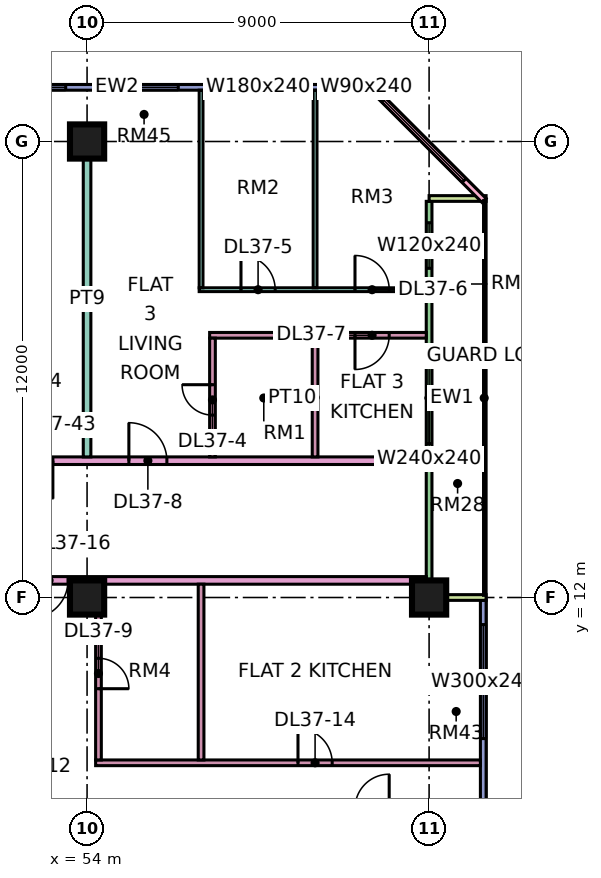
"""IFC4 building model, lengths in metres.
Left out: names, types, materials, properties, quantities, classifications, styles, units other than length and angle.
Written with IfcOpenShell. Run it as: python <this file> out.ifc"""

import sys

from ifc_helpers import new_model, si_unit, direction, frame, frame_2d, origin, origin_2d, place, context, subcontext, project, spatial, rectangle, extrude, element, fill, save


model = new_model("IFC4")
c1 = context("Model", 3, precision=1e-05, world=origin(), true_north=direction((0.0, 1.0)))
c2 = subcontext(c1, "Body", "Model", "MODEL_VIEW")
j1 = project(units=[si_unit("LENGTHUNIT", "METRE"), si_unit("PLANEANGLEUNIT", "RADIAN")], contexts=[c1])
p1 = place(None, origin())
s1 = spatial("IfcSite", under=j1, at=p1, CompositionType="ELEMENT")
p2 = place(p1, origin())
s2 = spatial("IfcBuilding", under=s1, at=p2, CompositionType="ELEMENT")
p3 = place(p2, frame((0.0, 0.0, 164.9)))
s3 = spatial("IfcBuildingStorey", under=s2, at=p3, CompositionType="ELEMENT", Elevation=164.9)
for number, where, z_axis, x_axis in (
    (1, (54.0, 12.0, 0.0), (0.0, 0.0, 1.0), (1.0, 0.0, 0.0)),
    (2, (54.0, 24.0, 0.0), (0.0, 0.0, 1.0), (1.0, 0.0, 0.0)),
    (3, (63.0, 12.0, 0.0), (0.0, 0.0, 1.0), (1.0, 0.0, 0.0)),
):
    element("IfcColumn", number, at=place(p3, frame(where, z_axis=z_axis, x_axis=x_axis)), inside=s3, PredefinedType="COLUMN", context=c2, shape_type="SweptSolid", body=[
        extrude(rectangle(XDim=0.9, YDim=0.9, at=origin_2d()), origin(), (0.0, 0.0, 1.0), 3.75),
    ])
p4 = place(p3, frame((61.5, 25.425, 0.0), z_axis=(0.0, 0.0, 1.0), x_axis=(-1.0, 0.0, 0.0)))
e4 = element("IfcWall", 4, at=p4, inside=s3, PredefinedType="SOLIDWALL", context=c2, shape_type="SweptSolid", body=[
    extrude(rectangle(XDim=13.425, YDim=0.15, at=frame_2d((6.712, 0.0))), origin(), (0.0, 0.0, 1.0), 3.35),
])
p5 = place(p4, frame((0.3, 0.0, 0.45)))
e5 = element("IfcOpeningElement", 5, at=p5, cuts=e4, PredefinedType="OPENING", context=c2, shape_type="SweptSolid", body=[
    extrude(rectangle(XDim=0.9, YDim=2.4, at=frame_2d((0.45, 1.2))), frame((0.0, 0.085, 0.0), z_axis=(0.0, -1.0, 0.0), x_axis=(1.0, 0.0, 0.0)), (0.0, 0.0, 1.0), 0.17),
])
p6 = place(p4, frame((2.1, 0.0, 0.45)))
e6 = element("IfcOpeningElement", 6, at=p6, cuts=e4, PredefinedType="OPENING", context=c2, shape_type="SweptSolid", body=[
    extrude(rectangle(XDim=1.8, YDim=2.4, at=frame_2d((0.9, 1.2))), frame((0.0, 0.085, 0.0), z_axis=(0.0, -1.0, 0.0), x_axis=(1.0, 0.0, 0.0)), (0.0, 0.0, 1.0), 0.17),
])
p7 = place(p4, frame((5.1, 0.0, 0.45)))
e7 = element("IfcOpeningElement", 7, at=p7, cuts=e4, PredefinedType="OPENING", context=c2, shape_type="SweptSolid", body=[
    extrude(rectangle(XDim=1.8, YDim=2.4, at=frame_2d((0.9, 1.2))), frame((0.0, 0.085, 0.0), z_axis=(0.0, -1.0, 0.0), x_axis=(1.0, 0.0, 0.0)), (0.0, 0.0, 1.0), 0.17),
])
p8 = place(p4, frame((8.062, 0.0, 0.45)))
e8 = element("IfcOpeningElement", 8, at=p8, cuts=e4, PredefinedType="OPENING", context=c2, shape_type="SweptSolid", body=[
    extrude(rectangle(XDim=4.8, YDim=2.4, at=frame_2d((2.4, 1.2))), frame((0.0, 0.085, 0.0), z_axis=(0.0, -1.0, 0.0), x_axis=(1.0, 0.0, 0.0)), (0.0, 0.0, 1.0), 0.17),
])
p9 = place(p3, frame((64.425, 1.5, 0.0), z_axis=(0.0, 0.0, 1.0), x_axis=(0.0, 1.0, 0.0)))
e9 = element("IfcWall", 9, at=p9, inside=s3, PredefinedType="SOLIDWALL", context=c2, shape_type="SweptSolid", body=[
    extrude(rectangle(XDim=10.425, YDim=0.15, at=frame_2d((5.212, 0.0))), origin(), (0.0, 0.0, 1.0), 3.35),
])
p10 = place(p9, frame((0.975, 0.0, 0.45)))
e10 = element("IfcOpeningElement", 10, at=p10, cuts=e9, PredefinedType="OPENING", context=c2, shape_type="SweptSolid", body=[
    extrude(rectangle(XDim=3.0, YDim=2.4, at=frame_2d((1.5, 1.2))), frame((0.0, 0.085, 0.0), z_axis=(0.0, -1.0, 0.0), x_axis=(1.0, 0.0, 0.0)), (0.0, 0.0, 1.0), 0.17),
])
p11 = place(p9, frame((6.788, 0.0, 0.45)))
e11 = element("IfcOpeningElement", 11, at=p11, cuts=e9, PredefinedType="OPENING", context=c2, shape_type="SweptSolid", body=[
    extrude(rectangle(XDim=3.0, YDim=2.4, at=frame_2d((1.5, 1.2))), frame((0.0, 0.085, 0.0), z_axis=(0.0, -1.0, 0.0), x_axis=(1.0, 0.0, 0.0)), (0.0, 0.0, 1.0), 0.17),
])
p12 = place(p3, frame((63.0, 12.075, 0.0), z_axis=(0.0, 0.0, 1.0), x_axis=(0.0, 1.0, 0.0)))
e12 = element("IfcWall", 12, at=p12, inside=s3, PredefinedType="SOLIDWALL", context=c2, shape_type="SweptSolid", body=[
    extrude(rectangle(XDim=10.35, YDim=0.15, at=frame_2d((5.175, 0.0))), origin(), (0.0, 0.0, 1.0), 3.35),
])
p13 = place(p12, frame((3.975, 0.0, 0.45)))
e13 = element("IfcOpeningElement", 13, at=p13, cuts=e12, PredefinedType="OPENING", context=c2, shape_type="SweptSolid", body=[
    extrude(rectangle(XDim=2.4, YDim=2.4, at=frame_2d((1.2, 1.2))), frame((0.0, 0.085, 0.0), z_axis=(0.0, -1.0, 0.0), x_axis=(1.0, 0.0, 0.0)), (0.0, 0.0, 1.0), 0.17),
])
p14 = place(p12, frame((8.587, 0.0, 0.45)))
e14 = element("IfcOpeningElement", 14, at=p14, cuts=e12, PredefinedType="OPENING", context=c2, shape_type="SweptSolid", body=[
    extrude(rectangle(XDim=1.2, YDim=2.4, at=frame_2d((0.6, 1.2))), frame((0.0, 0.085, 0.0), z_axis=(0.0, -1.0, 0.0), x_axis=(1.0, 0.0, 0.0)), (0.0, 0.0, 1.0), 0.17),
])
for number, where, z_axis, x_axis in (
    (15, (64.5, 12.0, 0.0), (0.0, 0.0, 1.0), (-1.0, 0.0, 0.0)),
    (16, (64.5, 22.5, 0.0), (0.0, 0.0, 1.0), (-1.0, 0.0, 0.0)),
):
    element("IfcWall", number, at=place(p3, frame(where, z_axis=z_axis, x_axis=x_axis)), inside=s3, PredefinedType="SOLIDWALL", context=c2, shape_type="SweptSolid", body=[
        extrude(rectangle(XDim=1.5, YDim=0.15, at=frame_2d((0.75, 0.0))), origin(), (0.0, 0.0, 1.0), 3.35),
    ])
p15 = place(p3, frame((64.447, 22.447, 0.0), z_axis=(0.0, 0.0, 1.0), x_axis=(-0.707106781187, 0.707106781187, 0.0)))
e17 = element("IfcWall", 17, at=p15, inside=s3, PredefinedType="SOLIDWALL", context=c2, shape_type="SweptSolid", body=[
    extrude(rectangle(XDim=4.243, YDim=0.15, at=frame_2d((2.121, 0.0))), origin(), (0.0, 0.0, 1.0), 3.35),
])
p16 = place(p15, frame((0.744, 0.0, 0.45)))
e18 = element("IfcOpeningElement", 18, at=p16, cuts=e17, PredefinedType="OPENING", context=c2, shape_type="SweptSolid", body=[
    extrude(rectangle(XDim=3.0, YDim=2.4, at=frame_2d((1.5, 1.2))), frame((0.0, 0.085, 0.0), z_axis=(0.0, -1.0, 0.0), x_axis=(1.0, 0.0, 0.0)), (0.0, 0.0, 1.0), 0.17),
])
p17 = place(p3, frame((40.65, 12.45, 0.0), z_axis=(0.0, 0.0, 1.0), x_axis=(1.0, 0.0, 0.0)))
e19 = element("IfcWall", 19, at=p17, inside=s3, PredefinedType="PARTITIONING", context=c2, shape_type="SweptSolid", body=[
    extrude(rectangle(XDim=22.276, YDim=0.2, at=frame_2d((11.138, 0.0))), origin(), (0.0, 0.0, 1.0), 3.35),
])
p18 = place(p17, frame((11.85, 0.0, 0.0)))
e20 = element("IfcOpeningElement", 20, at=p18, cuts=e19, PredefinedType="OPENING", context=c2, shape_type="SweptSolid", body=[
    extrude(rectangle(XDim=1.0, YDim=2.1, at=frame_2d((0.5, 1.05))), frame((0.0, 0.11, 0.0), z_axis=(0.0, -1.0, 0.0), x_axis=(1.0, 0.0, 0.0)), (0.0, 0.0, 1.0), 0.22),
])
p19 = place(p17, frame((1.05, 0.0, 0.0)))
e21 = element("IfcOpeningElement", 21, at=p19, cuts=e19, PredefinedType="OPENING", context=c2, shape_type="SweptSolid", body=[
    extrude(rectangle(XDim=1.0, YDim=2.1, at=frame_2d((0.5, 1.05))), frame((0.0, 0.11, 0.0), z_axis=(0.0, -1.0, 0.0), x_axis=(1.0, 0.0, 0.0)), (0.0, 0.0, 1.0), 0.22),
])
p20 = place(p3, frame((51.225, 15.6, 0.0), z_axis=(0.0, 0.0, 1.0), x_axis=(1.0, 0.0, 0.0)))
e22 = element("IfcWall", 22, at=p20, inside=s3, PredefinedType="PARTITIONING", context=c2, shape_type="SweptSolid", body=[
    extrude(rectangle(XDim=11.701, YDim=0.2, at=frame_2d((5.851, 0.0))), origin(), (0.0, 0.0, 1.0), 3.35),
])
p21 = place(p20, frame((3.875, 0.0, 0.0)))
e23 = element("IfcOpeningElement", 23, at=p21, cuts=e22, PredefinedType="OPENING", context=c2, shape_type="SweptSolid", body=[
    extrude(rectangle(XDim=1.0, YDim=2.1, at=frame_2d((0.5, 1.05))), frame((0.0, 0.11, 0.0), z_axis=(0.0, -1.0, 0.0), x_axis=(1.0, 0.0, 0.0)), (0.0, 0.0, 1.0), 0.22),
])
p22 = place(p20, frame((0.875, 0.0, 0.0)))
e24 = element("IfcOpeningElement", 24, at=p22, cuts=e22, PredefinedType="OPENING", context=c2, shape_type="SweptSolid", body=[
    extrude(rectangle(XDim=1.0, YDim=2.1, at=frame_2d((0.5, 1.05))), frame((0.0, 0.11, 0.0), z_axis=(0.0, -1.0, 0.0), x_axis=(1.0, 0.0, 0.0)), (0.0, 0.0, 1.0), 0.22),
])
p23 = place(p3, frame((54.0, 15.7, 0.0), z_axis=(0.0, 0.0, 1.0), x_axis=(0.0, 1.0, 0.0)))
e25 = element("IfcWall", 25, at=p23, inside=s3, PredefinedType="PARTITIONING", context=c2, shape_type="SweptSolid", body=[
    extrude(rectangle(XDim=8.3, YDim=0.2, at=frame_2d((4.15, 0.0))), origin(), (0.0, 0.0, 1.0), 3.35),
])
p24 = place(p3, frame((54.225, 7.65, 0.0), z_axis=(0.0, 0.0, 1.0), x_axis=(1.0, 0.0, 0.0)))
e26 = element("IfcWall", 26, at=p24, inside=s3, PredefinedType="PARTITIONING", context=c2, shape_type="SweptSolid", body=[
    extrude(rectangle(XDim=10.125, YDim=0.15, at=frame_2d((5.062, 0.0))), origin(), (0.0, 0.0, 1.0), 3.35),
])
p25 = place(p24, frame((5.325, 0.0, 0.0)))
e27 = element("IfcOpeningElement", 27, at=p25, cuts=e26, PredefinedType="OPENING", context=c2, shape_type="SweptSolid", body=[
    extrude(rectangle(XDim=0.9, YDim=2.1, at=frame_2d((0.45, 1.05))), frame((0.0, 0.085, 0.0), z_axis=(0.0, -1.0, 0.0), x_axis=(1.0, 0.0, 0.0)), (0.0, 0.0, 1.0), 0.17),
])
p26 = place(p3, frame((54.3, 7.725, 0.0), z_axis=(0.0, 0.0, 1.0), x_axis=(0.0, 1.0, 0.0)))
e28 = element("IfcWall", 28, at=p26, inside=s3, PredefinedType="PARTITIONING", context=c2, shape_type="SweptSolid", body=[
    extrude(rectangle(XDim=4.625, YDim=0.15, at=frame_2d((2.312, 0.0))), origin(), (0.0, 0.0, 1.0), 3.35),
])
p27 = place(p26, frame((1.875, 0.0, 0.0)))
e29 = element("IfcOpeningElement", 29, at=p27, cuts=e28, PredefinedType="OPENING", context=c2, shape_type="SweptSolid", body=[
    extrude(rectangle(XDim=0.8, YDim=2.1, at=frame_2d((0.4, 1.05))), frame((0.0, 0.085, 0.0), z_axis=(0.0, -1.0, 0.0), x_axis=(1.0, 0.0, 0.0)), (0.0, 0.0, 1.0), 0.17),
])
p28 = place(p3, frame((56.95, 20.1, 0.0), z_axis=(0.0, 0.0, 1.0), x_axis=(1.0, 0.0, 0.0)))
e30 = element("IfcWall", 30, at=p28, inside=s3, PredefinedType="PARTITIONING", context=c2, shape_type="SweptSolid", body=[
    extrude(rectangle(XDim=5.976, YDim=0.1, at=frame_2d((2.988, 0.0))), origin(), (0.0, 0.0, 1.0), 3.35),
])
p29 = place(p28, frame((1.1, 0.0, 0.0)))
e31 = element("IfcOpeningElement", 31, at=p29, cuts=e30, PredefinedType="OPENING", context=c2, shape_type="SweptSolid", body=[
    extrude(rectangle(XDim=0.9, YDim=2.1, at=frame_2d((0.45, 1.05))), frame((0.0, 0.06, 0.0), z_axis=(0.0, -1.0, 0.0), x_axis=(1.0, 0.0, 0.0)), (0.0, 0.0, 1.0), 0.12),
])
p30 = place(p28, frame((4.1, 0.0, 0.0)))
e32 = element("IfcOpeningElement", 32, at=p30, cuts=e30, PredefinedType="OPENING", context=c2, shape_type="SweptSolid", body=[
    extrude(rectangle(XDim=0.9, YDim=2.1, at=frame_2d((0.45, 1.05))), frame((0.0, 0.06, 0.0), z_axis=(0.0, -1.0, 0.0), x_axis=(1.0, 0.0, 0.0)), (0.0, 0.0, 1.0), 0.12),
])
p31 = place(p3, frame((57.0, 7.725, 0.0), z_axis=(0.0, 0.0, 1.0), x_axis=(0.0, 1.0, 0.0)))
e33 = element("IfcWall", 33, at=p31, inside=s3, PredefinedType="PARTITIONING", context=c2, shape_type="SweptSolid", body=[
    extrude(rectangle(XDim=4.625, YDim=0.15, at=frame_2d((2.312, 0.0))), origin(), (0.0, 0.0, 1.0), 3.35),
])
p32 = place(p3, frame((57.0, 20.15, 0.0), z_axis=(0.0, 0.0, 1.0), x_axis=(0.0, 1.0, 0.0)))
e34 = element("IfcWall", 34, at=p32, inside=s3, PredefinedType="PARTITIONING", context=c2, shape_type="SweptSolid", body=[
    extrude(rectangle(XDim=5.2, YDim=0.1, at=frame_2d((2.6, 0.0))), origin(), (0.0, 0.0, 1.0), 3.35),
])
p33 = place(p3, frame((57.225, 18.9, 0.0), z_axis=(0.0, 0.0, 1.0), x_axis=(1.0, 0.0, 0.0)))
e35 = element("IfcWall", 35, at=p33, inside=s3, PredefinedType="PARTITIONING", context=c2, shape_type="SweptSolid", body=[
    extrude(rectangle(XDim=5.701, YDim=0.15, at=frame_2d((2.851, 0.0))), origin(), (0.0, 0.0, 1.0), 3.35),
])
p34 = place(p33, frame((3.825, 0.0, 0.0)))
e36 = element("IfcOpeningElement", 36, at=p34, cuts=e35, PredefinedType="OPENING", context=c2, shape_type="SweptSolid", body=[
    extrude(rectangle(XDim=0.9, YDim=2.1, at=frame_2d((0.45, 1.05))), frame((0.0, 0.085, 0.0), z_axis=(0.0, -1.0, 0.0), x_axis=(1.0, 0.0, 0.0)), (0.0, 0.0, 1.0), 0.17),
])
p35 = place(p3, frame((57.3, 15.7, 0.0), z_axis=(0.0, 0.0, 1.0), x_axis=(0.0, 1.0, 0.0)))
e37 = element("IfcWall", 37, at=p35, inside=s3, PredefinedType="PARTITIONING", context=c2, shape_type="SweptSolid", body=[
    extrude(rectangle(XDim=3.125, YDim=0.15, at=frame_2d((1.562, 0.0))), origin(), (0.0, 0.0, 1.0), 3.35),
])
p36 = place(p35, frame((1.1, 0.0, 0.0)))
e38 = element("IfcOpeningElement", 38, at=p36, cuts=e37, PredefinedType="OPENING", context=c2, shape_type="SweptSolid", body=[
    extrude(rectangle(XDim=0.8, YDim=2.1, at=frame_2d((0.4, 1.05))), frame((0.0, 0.085, 0.0), z_axis=(0.0, -1.0, 0.0), x_axis=(1.0, 0.0, 0.0)), (0.0, 0.0, 1.0), 0.17),
])
p37 = place(p3, frame((60.0, 15.7, 0.0), z_axis=(0.0, 0.0, 1.0), x_axis=(0.0, 1.0, 0.0)))
e39 = element("IfcWall", 39, at=p37, inside=s3, PredefinedType="PARTITIONING", context=c2, shape_type="SweptSolid", body=[
    extrude(rectangle(XDim=3.125, YDim=0.15, at=frame_2d((1.562, 0.0))), origin(), (0.0, 0.0, 1.0), 3.35),
])
p38 = place(p3, frame((60.0, 20.15, 0.0), z_axis=(0.0, 0.0, 1.0), x_axis=(0.0, 1.0, 0.0)))
e40 = element("IfcWall", 40, at=p38, inside=s3, PredefinedType="PARTITIONING", context=c2, shape_type="SweptSolid", body=[
    extrude(rectangle(XDim=5.201, YDim=0.1, at=frame_2d((2.601, 0.0))), origin(), (0.0, 0.0, 1.0), 3.35),
])
p39 = place(p5, origin())
e41 = element("IfcWindow", 41, at=p39, inside=s3, PartitioningType="SINGLE_PANEL", PredefinedType="WINDOW", context=c2, shape_type="SweptSolid", body=[
    extrude(rectangle(XDim=0.9, YDim=2.4, at=frame_2d((0.45, 1.2))), frame((0.0, 0.03, 0.0), z_axis=(0.0, -1.0, 0.0), x_axis=(1.0, 0.0, 0.0)), (0.0, 0.0, 1.0), 0.06),
])
fill(e5, e41)
p40 = place(p6, origin())
e42 = element("IfcWindow", 42, at=p40, inside=s3, PartitioningType="SINGLE_PANEL", PredefinedType="WINDOW", context=c2, shape_type="SweptSolid", body=[
    extrude(rectangle(XDim=1.8, YDim=2.4, at=frame_2d((0.9, 1.2))), frame((0.0, 0.03, 0.0), z_axis=(0.0, -1.0, 0.0), x_axis=(1.0, 0.0, 0.0)), (0.0, 0.0, 1.0), 0.06),
])
fill(e6, e42)
p41 = place(p7, origin())
e43 = element("IfcWindow", 43, at=p41, inside=s3, PartitioningType="SINGLE_PANEL", PredefinedType="WINDOW", context=c2, shape_type="SweptSolid", body=[
    extrude(rectangle(XDim=1.8, YDim=2.4, at=frame_2d((0.9, 1.2))), frame((0.0, 0.03, 0.0), z_axis=(0.0, -1.0, 0.0), x_axis=(1.0, 0.0, 0.0)), (0.0, 0.0, 1.0), 0.06),
])
fill(e7, e43)
p42 = place(p8, origin())
e44 = element("IfcWindow", 44, at=p42, inside=s3, PartitioningType="SINGLE_PANEL", PredefinedType="WINDOW", context=c2, shape_type="SweptSolid", body=[
    extrude(rectangle(XDim=4.8, YDim=2.4, at=frame_2d((2.4, 1.2))), frame((0.0, 0.03, 0.0), z_axis=(0.0, -1.0, 0.0), x_axis=(1.0, 0.0, 0.0)), (0.0, 0.0, 1.0), 0.06),
])
fill(e8, e44)
p43 = place(p11, origin())
e45 = element("IfcWindow", 45, at=p43, inside=s3, PartitioningType="SINGLE_PANEL", PredefinedType="WINDOW", context=c2, shape_type="SweptSolid", body=[
    extrude(rectangle(XDim=3.0, YDim=2.4, at=frame_2d((1.5, 1.2))), frame((0.0, 0.03, 0.0), z_axis=(0.0, -1.0, 0.0), x_axis=(1.0, 0.0, 0.0)), (0.0, 0.0, 1.0), 0.06),
])
fill(e11, e45)
p44 = place(p13, origin())
e46 = element("IfcWindow", 46, at=p44, inside=s3, PartitioningType="SINGLE_PANEL", PredefinedType="WINDOW", context=c2, shape_type="SweptSolid", body=[
    extrude(rectangle(XDim=2.4, YDim=2.4, at=frame_2d((1.2, 1.2))), frame((0.0, 0.03, 0.0), z_axis=(0.0, -1.0, 0.0), x_axis=(1.0, 0.0, 0.0)), (0.0, 0.0, 1.0), 0.06),
])
fill(e13, e46)
p45 = place(p14, origin())
e47 = element("IfcWindow", 47, at=p45, inside=s3, PartitioningType="SINGLE_PANEL", PredefinedType="WINDOW", context=c2, shape_type="SweptSolid", body=[
    extrude(rectangle(XDim=1.2, YDim=2.4, at=frame_2d((0.6, 1.2))), frame((0.0, 0.03, 0.0), z_axis=(0.0, -1.0, 0.0), x_axis=(1.0, 0.0, 0.0)), (0.0, 0.0, 1.0), 0.06),
])
fill(e14, e47)
p46 = place(p16, origin())
e48 = element("IfcWindow", 48, at=p46, inside=s3, PartitioningType="SINGLE_PANEL", PredefinedType="WINDOW", context=c2, shape_type="SweptSolid", body=[
    extrude(rectangle(XDim=3.0, YDim=2.4, at=frame_2d((1.5, 1.2))), frame((0.0, 0.03, 0.0), z_axis=(0.0, -1.0, 0.0), x_axis=(1.0, 0.0, 0.0)), (0.0, 0.0, 1.0), 0.06),
])
fill(e18, e48)
p47 = place(p36, frame((0.8, 0.0, 0.0), z_axis=(0.0, 0.0, 1.0), x_axis=(-1.0, 0.0, 0.0)))
e49 = element("IfcDoor", 49, at=p47, inside=s3, OperationType="SINGLE_SWING_RIGHT", PredefinedType="DOOR", context=c2, shape_type="SweptSolid", body=[
    extrude(rectangle(XDim=0.8, YDim=2.1, at=frame_2d((0.4, 1.05))), frame((0.0, 0.025, 0.0), z_axis=(0.0, -1.0, 0.0), x_axis=(1.0, 0.0, 0.0)), (0.0, 0.0, 1.0), 0.05),
])
fill(e38, e49)
p48 = place(p29, origin())
e50 = element("IfcDoor", 50, at=p48, inside=s3, OperationType="SINGLE_SWING_LEFT", PredefinedType="DOOR", context=c2, shape_type="SweptSolid", body=[
    extrude(rectangle(XDim=0.9, YDim=2.1, at=frame_2d((0.45, 1.05))), frame((0.0, 0.025, 0.0), z_axis=(0.0, -1.0, 0.0), x_axis=(1.0, 0.0, 0.0)), (0.0, 0.0, 1.0), 0.05),
])
fill(e31, e50)
p49 = place(p30, origin())
e51 = element("IfcDoor", 51, at=p49, inside=s3, OperationType="SINGLE_SWING_LEFT", PredefinedType="DOOR", context=c2, shape_type="SweptSolid", body=[
    extrude(rectangle(XDim=0.9, YDim=2.1, at=frame_2d((0.45, 1.05))), frame((0.0, 0.025, 0.0), z_axis=(0.0, -1.0, 0.0), x_axis=(1.0, 0.0, 0.0)), (0.0, 0.0, 1.0), 0.05),
])
fill(e32, e51)
p50 = place(p34, frame((0.9, 0.0, 0.0), z_axis=(0.0, 0.0, 1.0), x_axis=(-1.0, 0.0, 0.0)))
e52 = element("IfcDoor", 52, at=p50, inside=s3, OperationType="SINGLE_SWING_LEFT", PredefinedType="DOOR", context=c2, shape_type="SweptSolid", body=[
    extrude(rectangle(XDim=0.9, YDim=2.1, at=frame_2d((0.45, 1.05))), frame((0.0, 0.025, 0.0), z_axis=(0.0, -1.0, 0.0), x_axis=(1.0, 0.0, 0.0)), (0.0, 0.0, 1.0), 0.05),
])
fill(e36, e52)
p51 = place(p21, origin())
e53 = element("IfcDoor", 53, at=p51, inside=s3, OperationType="SINGLE_SWING_LEFT", PredefinedType="DOOR", context=c2, shape_type="SweptSolid", body=[
    extrude(rectangle(XDim=1.0, YDim=2.1, at=frame_2d((0.5, 1.05))), frame((0.0, 0.025, 0.0), z_axis=(0.0, -1.0, 0.0), x_axis=(1.0, 0.0, 0.0)), (0.0, 0.0, 1.0), 0.05),
])
fill(e23, e53)
p52 = place(p27, frame((0.8, 0.0, 0.0), z_axis=(0.0, 0.0, 1.0), x_axis=(-1.0, 0.0, 0.0)))
e54 = element("IfcDoor", 54, at=p52, inside=s3, OperationType="SINGLE_SWING_LEFT", PredefinedType="DOOR", context=c2, shape_type="SweptSolid", body=[
    extrude(rectangle(XDim=0.8, YDim=2.1, at=frame_2d((0.4, 1.05))), frame((0.0, 0.025, 0.0), z_axis=(0.0, -1.0, 0.0), x_axis=(1.0, 0.0, 0.0)), (0.0, 0.0, 1.0), 0.05),
])
fill(e29, e54)
p53 = place(p25, origin())
e55 = element("IfcDoor", 55, at=p53, inside=s3, OperationType="SINGLE_SWING_LEFT", PredefinedType="DOOR", context=c2, shape_type="SweptSolid", body=[
    extrude(rectangle(XDim=0.9, YDim=2.1, at=frame_2d((0.45, 1.05))), frame((0.0, 0.025, 0.0), z_axis=(0.0, -1.0, 0.0), x_axis=(1.0, 0.0, 0.0)), (0.0, 0.0, 1.0), 0.05),
])
fill(e27, e55)
p54 = place(p18, frame((1.0, 0.0, 0.0), z_axis=(0.0, 0.0, 1.0), x_axis=(-1.0, 0.0, 0.0)))
e56 = element("IfcDoor", 56, at=p54, inside=s3, OperationType="SINGLE_SWING_LEFT", PredefinedType="DOOR", context=c2, shape_type="SweptSolid", body=[
    extrude(rectangle(XDim=1.0, YDim=2.1, at=frame_2d((0.5, 1.05))), frame((0.0, 0.025, 0.0), z_axis=(0.0, -1.0, 0.0), x_axis=(1.0, 0.0, 0.0)), (0.0, 0.0, 1.0), 0.05),
])
fill(e20, e56)
p55 = place(p22, origin())
e57 = element("IfcDoor", 57, at=p55, inside=s3, OperationType="SINGLE_SWING_RIGHT", PredefinedType="DOOR", context=c2, shape_type="SweptSolid", body=[
    extrude(rectangle(XDim=1.0, YDim=2.1, at=frame_2d((0.5, 1.05))), frame((0.0, 0.025, 0.0), z_axis=(0.0, -1.0, 0.0), x_axis=(1.0, 0.0, 0.0)), (0.0, 0.0, 1.0), 0.05),
])
fill(e24, e57)
save(model, sys.argv[1])
